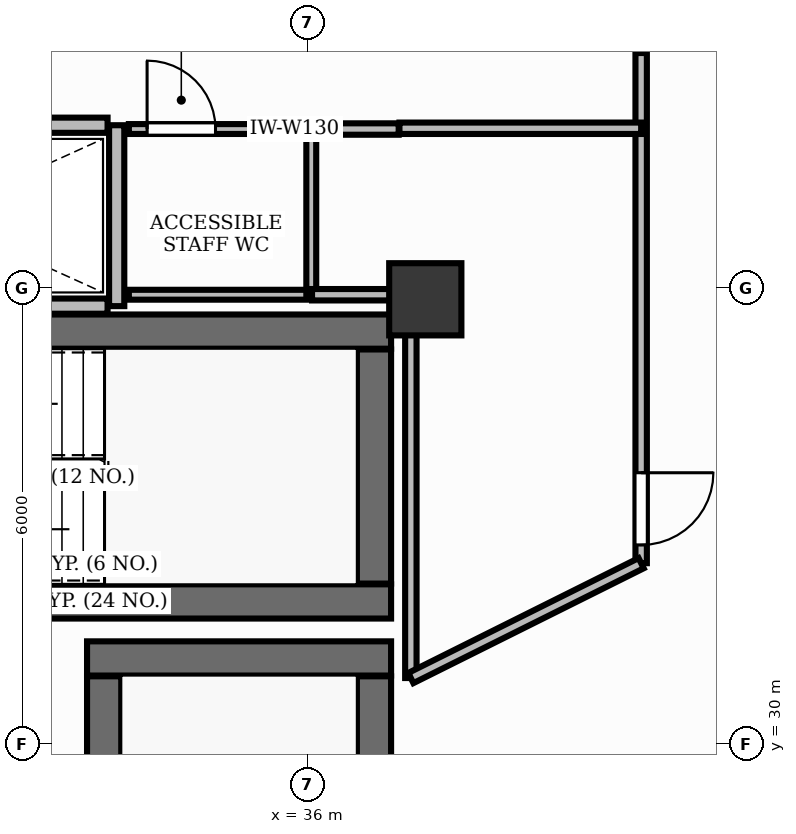
"""IFC4 building model, lengths in metres.
Left out: names, types, materials, properties, quantities, classifications, styles, units other than length and angle.
Written with IfcOpenShell. Run it as: python <this file> out.ifc"""

import sys

from ifc_helpers import new_model, si_unit, direction, frame, frame_2d, origin, origin_2d, place, context, subcontext, project, spatial, rectangle, extrude, element, fill, save


model = new_model("IFC4")
c1 = context("Model", 3, precision=1e-05, world=origin(), true_north=direction((0.0, 1.0)))
c2 = subcontext(c1, "Body", "Model", "MODEL_VIEW")
j1 = project(units=[si_unit("LENGTHUNIT", "METRE"), si_unit("PLANEANGLEUNIT", "RADIAN")], contexts=[c1])
p1 = place(None, origin())
s1 = spatial("IfcSite", under=j1, at=p1, CompositionType="ELEMENT")
p2 = place(p1, origin())
s2 = spatial("IfcBuilding", under=s1, at=p2, CompositionType="ELEMENT")
p3 = place(p2, frame((0.0, 0.0, 144.6)))
s3 = spatial("IfcBuildingStorey", under=s2, at=p3, CompositionType="ELEMENT", Elevation=144.6)
p4 = place(p3, frame((28.852, 35.425, 0.0), z_axis=(0.0, 0.0, 1.0), x_axis=(1.0, 0.0, 0.0)))
e1 = element("IfcWall", 1, at=p4, inside=s3, PredefinedType="SHEAR", context=c2, shape_type="SweptSolid", body=[
    extrude(rectangle(XDim=8.248, YDim=0.45, at=frame_2d((4.124, 0.0))), origin(), (0.0, 0.0, 1.0), 3.88),
])
p5 = place(p3, frame((28.35, 31.875, 0.0), z_axis=(0.0, 0.0, 1.0), x_axis=(1.0, 0.0, 0.0)))
e2 = element("IfcWall", 2, at=p5, inside=s3, PredefinedType="SHEAR", context=c2, shape_type="SweptSolid", body=[
    extrude(rectangle(XDim=8.75, YDim=0.45, at=frame_2d((4.375, 0.0))), origin(), (0.0, 0.0, 1.0), 3.88),
])
p6 = place(p3, frame((36.875, 32.11, 0.0), z_axis=(0.0, 0.0, 1.0), x_axis=(0.0, 1.0, 0.0)))
e3 = element("IfcWall", 3, at=p6, inside=s3, PredefinedType="SHEAR", context=c2, shape_type="SweptSolid", body=[
    extrude(rectangle(XDim=3.08, YDim=0.45, at=frame_2d((1.54, 0.0))), origin(), (0.0, 0.0, 1.0), 3.88),
])
p7 = place(p3, frame((33.1, 31.125, 0.0), z_axis=(0.0, 0.0, 1.0), x_axis=(1.0, 0.0, 0.0)))
e4 = element("IfcWall", 4, at=p7, inside=s3, PredefinedType="SHEAR", context=c2, shape_type="SweptSolid", body=[
    extrude(rectangle(XDim=4.0, YDim=0.45, at=frame_2d((2.0, 0.0))), origin(), (0.0, 0.0, 1.0), 3.88),
])
p8 = place(p3, frame((36.875, 23.11, 0.0), z_axis=(0.0, 0.0, 1.0), x_axis=(0.0, 1.0, 0.0)))
e5 = element("IfcWall", 5, at=p8, inside=s3, PredefinedType="SHEAR", context=c2, shape_type="SweptSolid", body=[
    extrude(rectangle(XDim=7.78, YDim=0.45, at=frame_2d((3.89, 0.0))), origin(), (0.0, 0.0, 1.0), 3.88),
])
p9 = place(p3, frame((33.325, 23.11, 0.0), z_axis=(0.0, 0.0, 1.0), x_axis=(0.0, 1.0, 0.0)))
e6 = element("IfcWall", 6, at=p9, inside=s3, PredefinedType="SHEAR", context=c2, shape_type="SweptSolid", body=[
    extrude(rectangle(XDim=7.78, YDim=0.45, at=frame_2d((3.89, 0.0))), origin(), (0.0, 0.0, 1.0), 3.88),
])
p10 = place(p9, frame((0.2, 0.0, 0.0)))
e7 = element("IfcOpeningElement", 7, at=p10, cuts=e6, PredefinedType="OPENING", context=c2, shape_type="SweptSolid", body=[
    extrude(rectangle(XDim=1.05, YDim=2.15, at=frame_2d((0.525, 1.075))), frame((0.0, 0.24, 0.0), z_axis=(0.0, -1.0, 0.0), x_axis=(1.0, 0.0, 0.0)), (0.0, 0.0, 1.0), 0.48),
])
p11 = place(p3, frame((37.55, 35.85, -0.0), z_axis=(0.0, 0.0, 1.0), x_axis=(1.0, 0.0, 0.0)))
e8 = element("IfcColumn", 8, at=p11, inside=s3, PredefinedType="PILASTER", context=c2, shape_type="SweptSolid", body=[
    extrude(rectangle(XDim=0.95, YDim=0.95, at=origin_2d()), origin(), (0.0, 0.0, 1.0), 3.881),
])
p12 = place(p3, frame((33.49, 35.76, 0.0), z_axis=(0.0, 0.0, 1.0), x_axis=(0.0, 1.0, 0.0)))
e9 = element("IfcWall", 9, at=p12, inside=s3, PredefinedType="PARTITIONING", context=c2, shape_type="SweptSolid", body=[
    extrude(rectangle(XDim=2.38, YDim=0.2, at=frame_2d((1.19, 0.0))), origin(), (0.0, 0.0, 1.0), 2.22),
])
for number, where, z_axis, x_axis in (
    (10, (28.8, 35.76, 0.0), (0.0, 0.0, 1.0), (1.0, 0.0, 0.0)),
    (11, (28.8, 38.14, 0.0), (0.0, 0.0, 1.0), (1.0, 0.0, 0.0)),
):
    element("IfcWall", number, at=place(p3, frame(where, z_axis=z_axis, x_axis=x_axis)), inside=s3, PredefinedType="PARTITIONING", context=c2, shape_type="SweptSolid", body=[
        extrude(rectangle(XDim=4.57, YDim=0.2, at=frame_2d((2.285, 0.0))), origin(), (0.0, 0.0, 1.0), 2.22),
    ])
p13 = place(p3, frame((33.65, 38.09, 0.0), z_axis=(0.0, 0.0, 1.0), x_axis=(1.0, 0.0, 0.0)))
e12 = element("IfcWall", 12, at=p13, inside=s3, PredefinedType="PARTITIONING", context=c2, shape_type="SweptSolid", body=[
    extrude(rectangle(XDim=2.4, YDim=0.13, at=frame_2d((1.2, 0.0))), origin(), (0.0, 0.0, 1.0), 2.22),
])
p14 = place(p13, frame((0.24, 0.0, 0.0)))
e13 = element("IfcOpeningElement", 13, at=p14, cuts=e12, PredefinedType="OPENING", context=c2, shape_type="SweptSolid", body=[
    extrude(rectangle(XDim=0.9, YDim=2.15, at=frame_2d((0.45, 1.075))), frame((0.0, 0.08, 0.0), z_axis=(0.0, -1.0, 0.0), x_axis=(1.0, 0.0, 0.0)), (0.0, 0.0, 1.0), 0.16),
])
p15 = place(p3, frame((40.39, 39.09, 0.0), z_axis=(0.0, 0.0, 1.0), x_axis=(0.0, -1.0, 0.0)))
e14 = element("IfcWall", 14, at=p15, inside=s3, PredefinedType="PARTITIONING", context=c2, shape_type="SweptSolid", body=[
    extrude(rectangle(XDim=6.712, YDim=0.15, at=frame_2d((3.356, 0.0))), origin(), (0.0, 0.0, 1.0), 2.22),
])
p16 = place(p15, frame((5.522, 0.0, 0.0)))
e15 = element("IfcOpeningElement", 15, at=p16, cuts=e14, PredefinedType="OPENING", context=c2, shape_type="SweptSolid", body=[
    extrude(rectangle(XDim=0.95, YDim=2.15, at=frame_2d((0.475, 1.075))), frame((0.0, 0.09, 0.0), z_axis=(0.0, -1.0, 0.0), x_axis=(1.0, 0.0, 0.0)), (0.0, 0.0, 1.0), 0.18),
])
p17 = place(p3, frame((36.05, 35.91, 0.0), z_axis=(0.0, 0.0, 1.0), x_axis=(-1.0, 0.0, 0.0)))
e16 = element("IfcWall", 16, at=p17, inside=s3, PredefinedType="PARTITIONING", context=c2, shape_type="SweptSolid", body=[
    extrude(rectangle(XDim=2.4, YDim=0.13, at=frame_2d((1.2, 0.0))), origin(), (0.0, 0.0, 1.0), 2.22),
])
p18 = place(p3, frame((36.05, 38.09, 0.0), z_axis=(0.0, 0.0, 1.0), x_axis=(0.0, -1.0, 0.0)))
e17 = element("IfcWall", 17, at=p18, inside=s3, PredefinedType="PARTITIONING", context=c2, shape_type="SweptSolid", body=[
    extrude(rectangle(XDim=2.18, YDim=0.13, at=frame_2d((1.09, 0.0))), origin(), (0.0, 0.0, 1.0), 2.22),
])
p19 = place(p3, frame((37.36, 30.867, 0.0), z_axis=(0.0, 0.0, 1.0), x_axis=(0.0, 1.0, 0.0)))
e18 = element("IfcWall", 18, at=p19, inside=s3, PredefinedType="PARTITIONING", context=c2, shape_type="SweptSolid", body=[
    extrude(rectangle(XDim=5.032, YDim=0.15, at=frame_2d((2.516, 0.0))), origin(), (0.0, 0.0, 1.0), 2.22),
])
p20 = place(p3, frame((37.35, 35.91, 0.0), z_axis=(0.0, 0.0, 1.0), x_axis=(-1.0, 0.0, 0.0)))
e19 = element("IfcWall", 19, at=p20, inside=s3, PredefinedType="PARTITIONING", context=c2, shape_type="SweptSolid", body=[
    extrude(rectangle(XDim=1.29, YDim=0.15, at=frame_2d((0.645, 0.0))), origin(), (0.0, 0.0, 1.0), 2.22),
])
p21 = place(p3, frame((36.06, 38.09, 0.0), z_axis=(0.0, 0.0, 1.0), x_axis=(1.0, 0.0, 0.0)))
e20 = element("IfcWall", 20, at=p21, inside=s3, PredefinedType="PARTITIONING", context=c2, shape_type="SweptSolid", body=[
    extrude(rectangle(XDim=1.14, YDim=0.15, at=frame_2d((0.57, 0.0))), origin(), (0.0, 0.0, 1.0), 2.22),
])
p22 = place(p3, frame((37.21, 38.1, 0.0), z_axis=(0.0, 0.0, 1.0), x_axis=(1.0, 0.0, 0.0)))
e21 = element("IfcWall", 21, at=p22, inside=s3, PredefinedType="PARTITIONING", context=c2, shape_type="SweptSolid", body=[
    extrude(rectangle(XDim=3.18, YDim=0.15, at=frame_2d((1.59, 0.0))), origin(), (0.0, 0.0, 1.0), 2.22),
])
p23 = place(p3, frame((40.39, 32.378, 0.0), z_axis=(0.0, 0.0, 1.0), x_axis=(-0.894917018808, -0.44623259568, 0.0)))
e22 = element("IfcWall", 22, at=p23, inside=s3, PredefinedType="PARTITIONING", context=c2, shape_type="SweptSolid", body=[
    extrude(rectangle(XDim=3.385, YDim=0.15, at=frame_2d((1.693, 0.0))), origin(), (0.0, 0.0, 1.0), 2.22),
])
p24 = place(p14, origin())
e23 = element("IfcDoor", 23, at=p24, inside=s3, OperationType="SINGLE_SWING_LEFT", PredefinedType="DOOR", context=c2, shape_type="SweptSolid", body=[
    extrude(rectangle(XDim=0.9, YDim=2.15, at=frame_2d((0.45, 1.075))), frame((0.0, 0.025, 0.0), z_axis=(0.0, -1.0, 0.0), x_axis=(1.0, 0.0, 0.0)), (0.0, 0.0, 1.0), 0.05),
])
fill(e13, e23)
p25 = place(p16, origin())
e24 = element("IfcDoor", 24, at=p25, inside=s3, OperationType="SINGLE_SWING_LEFT", PredefinedType="DOOR", context=c2, shape_type="SweptSolid", body=[
    extrude(rectangle(XDim=0.95, YDim=2.15, at=frame_2d((0.475, 1.075))), frame((0.0, 0.025, 0.0), z_axis=(0.0, -1.0, 0.0), x_axis=(1.0, 0.0, 0.0)), (0.0, 0.0, 1.0), 0.05),
])
fill(e15, e24)
save(model, sys.argv[1])
